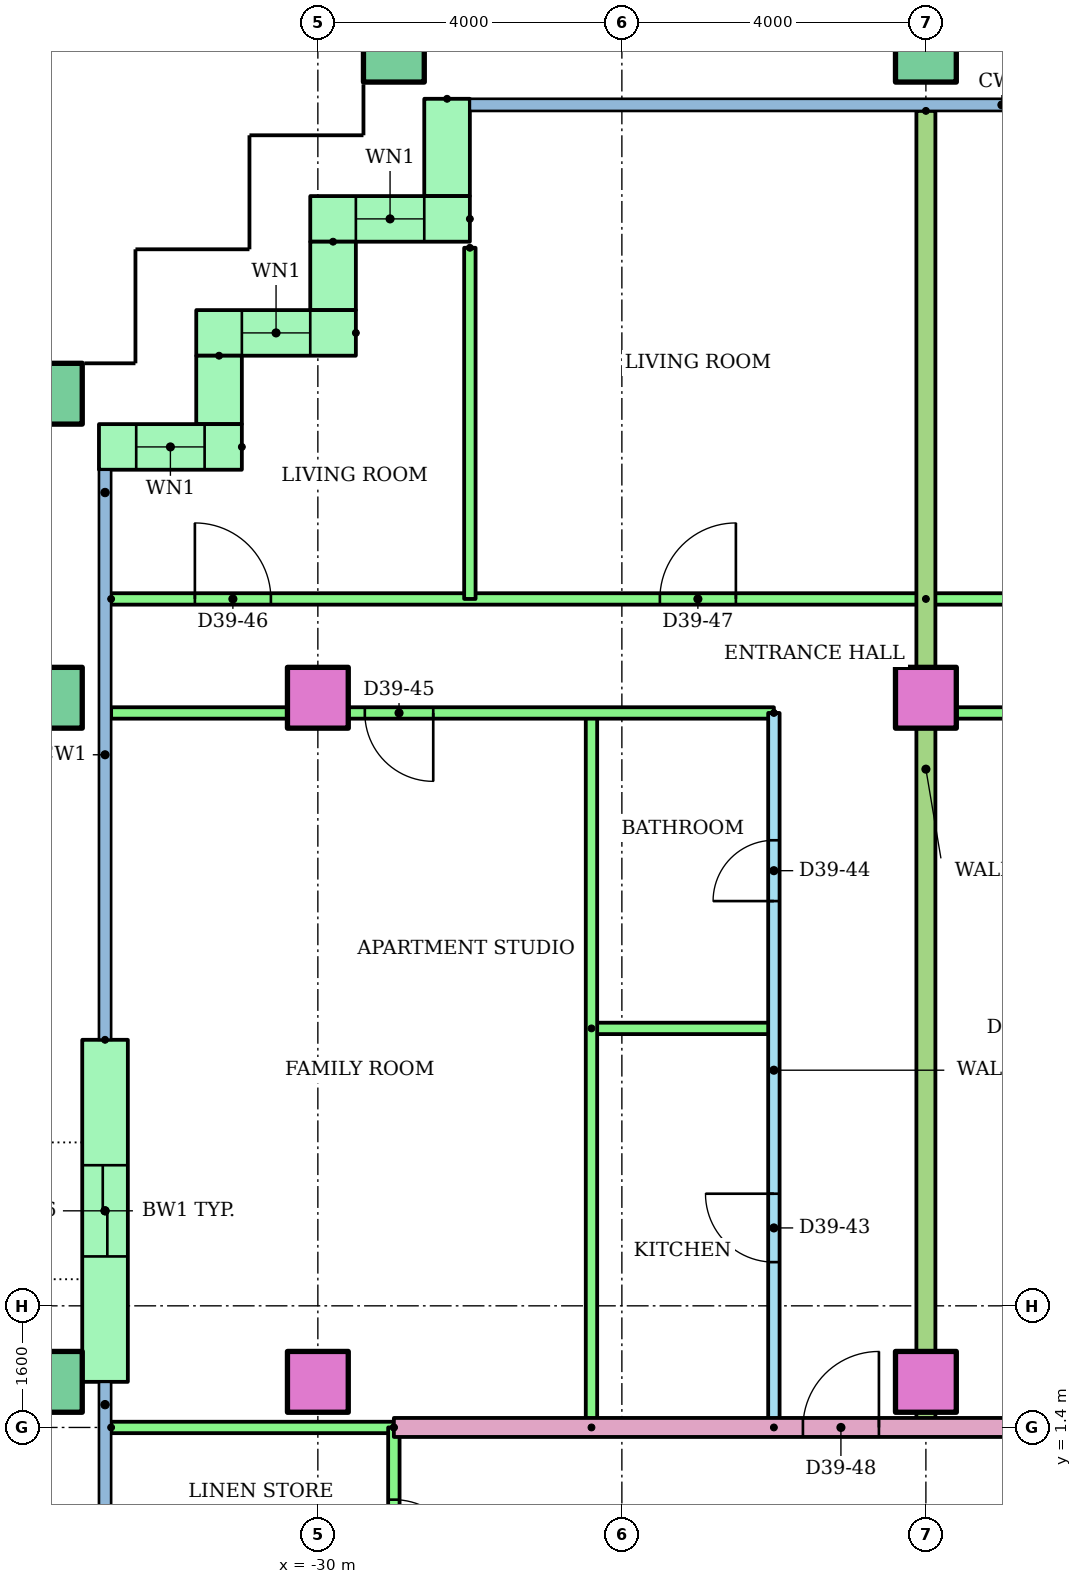
"""IFC4 building model, lengths in metres.
Left out: names, types, materials, properties, quantities, classifications, styles, units other than length and angle.
Written with IfcOpenShell. Run it as: python <this file> out.ifc"""

import sys

from ifc_helpers import new_model, si_unit, direction, frame, frame_2d, origin, origin_2d, place, context, subcontext, project, spatial, rectangle, hollow_rectangle, extrude, element, fill, save


model = new_model("IFC4")
c1 = context("Model", 3, precision=1e-05, world=origin(), true_north=direction((0.0, 1.0)))
c2 = subcontext(c1, "Body", "Model", "MODEL_VIEW")
j1 = project(units=[si_unit("LENGTHUNIT", "METRE"), si_unit("PLANEANGLEUNIT", "RADIAN")], contexts=[c1])
p1 = place(None, origin())
s1 = spatial("IfcSite", under=j1, at=p1, CompositionType="ELEMENT")
p2 = place(p1, origin())
s2 = spatial("IfcBuilding", under=s1, at=p2, CompositionType="ELEMENT")
p3 = place(p2, frame((0.0, 0.0, 148.6)))
s3 = spatial("IfcBuildingStorey", under=s2, at=p3, CompositionType="ELEMENT", Elevation=148.6)
p4 = place(p3, frame((-33.5, 2.0, 0.0)))
e1 = element("IfcColumn", 1, at=p4, inside=s3, PredefinedType="COLUMN", context=c2, shape_type="SweptSolid", body=[
    extrude(hollow_rectangle(XDim=0.8, YDim=0.8, WallThickness=0.04, at=origin_2d()), origin(), (0.0, 0.0, 1.0), 3.2),
])
for number, where in (
    (2, (-30.0, 2.0, 0.0)),
    (3, (-22.0, 2.0, 0.0)),
):
    element("IfcColumn", number, at=place(p3, frame(where)), inside=s3, PredefinedType="COLUMN", context=c2, shape_type="SweptSolid", body=[
        extrude(rectangle(XDim=0.8, YDim=0.8, at=origin_2d()), origin(), (0.0, 0.0, 1.0), 3.2),
    ])
p5 = place(p3, frame((-33.5, 11.0, 0.0)))
e4 = element("IfcColumn", 4, at=p5, inside=s3, PredefinedType="COLUMN", context=c2, shape_type="SweptSolid", body=[
    extrude(hollow_rectangle(XDim=0.8, YDim=0.8, WallThickness=0.04, at=origin_2d()), origin(), (0.0, 0.0, 1.0), 3.2),
])
for number, where in (
    (5, (-30.0, 11.0, 0.0)),
    (6, (-22.0, 11.0, 0.0)),
):
    element("IfcColumn", number, at=place(p3, frame(where)), inside=s3, PredefinedType="COLUMN", context=c2, shape_type="SweptSolid", body=[
        extrude(rectangle(XDim=0.8, YDim=0.8, at=origin_2d()), origin(), (0.0, 0.0, 1.0), 3.2),
    ])
for number, where in (
    (7, (-33.5, 15.0, 0.0)),
    (8, (-29.0, 19.5, 0.0)),
    (9, (-22.0, 19.5, 0.0)),
):
    element("IfcColumn", number, at=place(p3, frame(where)), inside=s3, PredefinedType="COLUMN", context=c2, shape_type="SweptSolid", body=[
        extrude(hollow_rectangle(XDim=0.8, YDim=0.8, WallThickness=0.04, at=origin_2d()), origin(), (0.0, 0.0, 1.0), 3.2),
    ])
p6 = place(p3, frame((-28.3, 18.88, 0.0), z_axis=(0.0, 0.0, 1.0), x_axis=(0.0, -1.0, 0.0)))
e10 = element("IfcWall", 10, at=p6, inside=s3, PredefinedType="STANDARD", context=c2, shape_type="SweptSolid", body=[
    extrude(rectangle(XDim=1.28, YDim=0.6, at=frame_2d((0.64, 0.0))), origin(), (0.0, 0.0, 1.0), 2.8),
])
p7 = place(p3, frame((-28.0, 17.3, 0.0), z_axis=(0.0, 0.0, 1.0), x_axis=(-1.0, 0.0, 0.0)))
e11 = element("IfcWall", 11, at=p7, inside=s3, PredefinedType="STANDARD", context=c2, shape_type="SweptSolid", body=[
    extrude(rectangle(XDim=2.1, YDim=0.6, at=frame_2d((1.05, 0.0))), origin(), (0.0, 0.0, 1.0), 2.8),
])
p8 = place(p7, frame((0.6, 0.0, 0.9)))
e12 = element("IfcOpeningElement", 12, at=p8, cuts=e11, PredefinedType="OPENING", context=c2, shape_type="SweptSolid", body=[
    extrude(rectangle(XDim=0.9, YDim=1.5, at=frame_2d((0.45, 0.75))), frame((0.0, 0.31, 0.0), z_axis=(0.0, -1.0, 0.0), x_axis=(1.0, 0.0, 0.0)), (0.0, 0.0, 1.0), 0.62),
])
p9 = place(p3, frame((-29.8, 17.0, 0.0), z_axis=(0.0, 0.0, 1.0), x_axis=(0.0, -1.0, 0.0)))
e13 = element("IfcWall", 13, at=p9, inside=s3, PredefinedType="STANDARD", context=c2, shape_type="SweptSolid", body=[
    extrude(rectangle(XDim=0.9, YDim=0.6, at=frame_2d((0.45, 0.0))), origin(), (0.0, 0.0, 1.0), 2.8),
])
p10 = place(p3, frame((-29.5, 15.8, 0.0), z_axis=(0.0, 0.0, 1.0), x_axis=(-1.0, 0.0, 0.0)))
e14 = element("IfcWall", 14, at=p10, inside=s3, PredefinedType="STANDARD", context=c2, shape_type="SweptSolid", body=[
    extrude(rectangle(XDim=2.1, YDim=0.6, at=frame_2d((1.05, 0.0))), origin(), (0.0, 0.0, 1.0), 2.8),
])
p11 = place(p10, frame((0.6, 0.0, 0.9)))
e15 = element("IfcOpeningElement", 15, at=p11, cuts=e14, PredefinedType="OPENING", context=c2, shape_type="SweptSolid", body=[
    extrude(rectangle(XDim=0.9, YDim=1.5, at=frame_2d((0.45, 0.75))), frame((0.0, 0.31, 0.0), z_axis=(0.0, -1.0, 0.0), x_axis=(1.0, 0.0, 0.0)), (0.0, 0.0, 1.0), 0.62),
])
p12 = place(p3, frame((-31.3, 15.5, 0.0), z_axis=(0.0, 0.0, 1.0), x_axis=(0.0, -1.0, 0.0)))
e16 = element("IfcWall", 16, at=p12, inside=s3, PredefinedType="STANDARD", context=c2, shape_type="SweptSolid", body=[
    extrude(rectangle(XDim=0.9, YDim=0.6, at=frame_2d((0.45, 0.0))), origin(), (0.0, 0.0, 1.0), 2.8),
])
p13 = place(p3, frame((-31.0, 14.3, 0.0), z_axis=(0.0, 0.0, 1.0), x_axis=(-1.0, 0.0, 0.0)))
e17 = element("IfcWall", 17, at=p13, inside=s3, PredefinedType="STANDARD", context=c2, shape_type="SweptSolid", body=[
    extrude(rectangle(XDim=1.88, YDim=0.6, at=frame_2d((0.94, 0.0))), origin(), (0.0, 0.0, 1.0), 2.8),
])
p14 = place(p13, frame((0.49, 0.0, 0.9)))
e18 = element("IfcOpeningElement", 18, at=p14, cuts=e17, PredefinedType="OPENING", context=c2, shape_type="SweptSolid", body=[
    extrude(rectangle(XDim=0.9, YDim=1.5, at=frame_2d((0.45, 0.75))), frame((0.0, 0.31, 0.0), z_axis=(0.0, -1.0, 0.0), x_axis=(1.0, 0.0, 0.0)), (0.0, 0.0, 1.0), 0.62),
])
p15 = place(p3, frame((-32.8, 6.5, 0.0), z_axis=(0.0, 0.0, 1.0), x_axis=(0.0, -1.0, 0.0)))
e19 = element("IfcWall", 19, at=p15, inside=s3, PredefinedType="STANDARD", context=c2, shape_type="SweptSolid", body=[
    extrude(rectangle(XDim=4.5, YDim=0.6, at=frame_2d((2.25, 0.0))), origin(), (0.0, 0.0, 1.0), 2.8),
])
p16 = place(p15, frame((1.65, 0.0, 0.0)))
e20 = element("IfcOpeningElement", 20, at=p16, cuts=e19, PredefinedType="OPENING", context=c2, shape_type="SweptSolid", body=[
    extrude(rectangle(XDim=1.2, YDim=2.1, at=frame_2d((0.6, 1.05))), frame((0.0, 0.31, 0.0), z_axis=(0.0, -1.0, 0.0), x_axis=(1.0, 0.0, 0.0)), (0.0, 0.0, 1.0), 0.62),
])
p17 = place(p3, frame((-24.0, 1.4, 0.0), z_axis=(0.0, 0.0, 1.0), x_axis=(0.0, 1.0, 0.0)))
e21 = element("IfcWall", 21, at=p17, inside=s3, PredefinedType="PARTITIONING", context=c2, shape_type="SweptSolid", body=[
    extrude(rectangle(XDim=9.4, YDim=0.15, at=frame_2d((4.7, 0.0))), origin(), (0.0, 0.0, 1.0), 2.4),
])
p18 = place(p17, frame((2.175, 0.0, 0.0)))
e22 = element("IfcOpeningElement", 22, at=p18, cuts=e21, PredefinedType="OPENING", context=c2, shape_type="SweptSolid", body=[
    extrude(rectangle(XDim=0.9, YDim=2.1, at=frame_2d((0.45, 1.05))), frame((0.0, 0.085, 0.0), z_axis=(0.0, -1.0, 0.0), x_axis=(1.0, 0.0, 0.0)), (0.0, 0.0, 1.0), 0.17),
])
p19 = place(p17, frame((6.925, 0.0, 0.0)))
e23 = element("IfcOpeningElement", 23, at=p19, cuts=e21, PredefinedType="OPENING", context=c2, shape_type="SweptSolid", body=[
    extrude(rectangle(XDim=0.8, YDim=2.1, at=frame_2d((0.4, 1.05))), frame((0.0, 0.085, 0.0), z_axis=(0.0, -1.0, 0.0), x_axis=(1.0, 0.0, 0.0)), (0.0, 0.0, 1.0), 0.17),
])
p20 = place(p3, frame((-26.4, 6.65, 0.0)))
e24 = element("IfcWall", 24, at=p20, inside=s3, PredefinedType="PARTITIONING", context=c2, shape_type="SweptSolid", body=[
    extrude(rectangle(XDim=2.4, YDim=0.15, at=frame_2d((1.2, 0.0))), origin(), (0.0, 0.0, 1.0), 2.4),
])
p21 = place(p3, frame((-26.4, 1.4, 0.0), z_axis=(0.0, 0.0, 1.0), x_axis=(0.0, 1.0, 0.0)))
e25 = element("IfcWall", 25, at=p21, inside=s3, PredefinedType="PARTITIONING", context=c2, shape_type="SweptSolid", body=[
    extrude(rectangle(XDim=9.4, YDim=0.15, at=frame_2d((4.7, 0.0))), origin(), (0.0, 0.0, 1.0), 2.4),
])
p22 = place(p3, frame((-24.0, 10.8, 0.0), z_axis=(0.0, 0.0, 1.0), x_axis=(-1.0, 0.0, 0.0)))
e26 = element("IfcWall", 26, at=p22, inside=s3, PredefinedType="PARTITIONING", context=c2, shape_type="SweptSolid", body=[
    extrude(rectangle(XDim=8.72, YDim=0.15, at=frame_2d((4.36, 0.0))), origin(), (0.0, 0.0, 1.0), 2.4),
])
p23 = place(p22, frame((4.482, 0.0, 0.0)))
e27 = element("IfcOpeningElement", 27, at=p23, cuts=e26, PredefinedType="OPENING", context=c2, shape_type="SweptSolid", body=[
    extrude(rectangle(XDim=0.9, YDim=2.1, at=frame_2d((0.45, 1.05))), frame((0.0, 0.085, 0.0), z_axis=(0.0, -1.0, 0.0), x_axis=(1.0, 0.0, 0.0)), (0.0, 0.0, 1.0), 0.17),
])
p24 = place(p3, frame((-32.72, 12.3, 0.0)))
e28 = element("IfcWall", 28, at=p24, inside=s3, PredefinedType="PARTITIONING", context=c2, shape_type="SweptSolid", body=[
    extrude(rectangle(XDim=10.72, YDim=0.15, at=frame_2d((5.36, 0.0))), origin(), (0.0, 0.0, 1.0), 2.4),
])
p25 = place(p24, frame((1.102, 0.0, 0.0)))
e29 = element("IfcOpeningElement", 29, at=p25, cuts=e28, PredefinedType="OPENING", context=c2, shape_type="SweptSolid", body=[
    extrude(rectangle(XDim=1.0, YDim=2.1, at=frame_2d((0.5, 1.05))), frame((0.0, 0.085, 0.0), z_axis=(0.0, -1.0, 0.0), x_axis=(1.0, 0.0, 0.0)), (0.0, 0.0, 1.0), 0.17),
])
p26 = place(p24, frame((7.22, 0.0, 0.0)))
e30 = element("IfcOpeningElement", 30, at=p26, cuts=e28, PredefinedType="OPENING", context=c2, shape_type="SweptSolid", body=[
    extrude(rectangle(XDim=1.0, YDim=2.1, at=frame_2d((0.5, 1.05))), frame((0.0, 0.085, 0.0), z_axis=(0.0, -1.0, 0.0), x_axis=(1.0, 0.0, 0.0)), (0.0, 0.0, 1.0), 0.17),
])
p27 = place(p3, frame((-28.0, 16.92, 0.0), z_axis=(0.0, 0.0, 1.0), x_axis=(0.0, -1.0, 0.0)))
e31 = element("IfcWall", 31, at=p27, inside=s3, PredefinedType="PARTITIONING", context=c2, shape_type="SweptSolid", body=[
    extrude(rectangle(XDim=4.62, YDim=0.15, at=frame_2d((2.31, 0.0))), origin(), (0.0, 0.0, 1.0), 2.4),
])
p28 = place(p3, frame((-16.0, 10.8, 0.0), z_axis=(0.0, 0.0, 1.0), x_axis=(-1.0, 0.0, 0.0)))
e32 = element("IfcWall", 32, at=p28, inside=s3, PredefinedType="PARTITIONING", context=c2, shape_type="SweptSolid", body=[
    extrude(rectangle(XDim=6.0, YDim=0.15, at=frame_2d((3.0, 0.0))), origin(), (0.0, 0.0, 1.0), 2.4),
])
p29 = place(p28, frame((3.75, 0.0, 0.0)))
e33 = element("IfcOpeningElement", 33, at=p29, cuts=e32, PredefinedType="OPENING", context=c2, shape_type="SweptSolid", body=[
    extrude(rectangle(XDim=0.9, YDim=2.1, at=frame_2d((0.45, 1.05))), frame((0.0, 0.085, 0.0), z_axis=(0.0, -1.0, 0.0), x_axis=(1.0, 0.0, 0.0)), (0.0, 0.0, 1.0), 0.17),
])
p30 = place(p3, frame((-22.0, 12.3, 0.0)))
e34 = element("IfcWall", 34, at=p30, inside=s3, PredefinedType="PARTITIONING", context=c2, shape_type="SweptSolid", body=[
    extrude(rectangle(XDim=8.0, YDim=0.15, at=frame_2d((4.0, 0.0))), origin(), (0.0, 0.0, 1.0), 2.4),
])
p31 = place(p30, frame((3.5, 0.0, 0.0)))
e35 = element("IfcOpeningElement", 35, at=p31, cuts=e34, PredefinedType="OPENING", context=c2, shape_type="SweptSolid", body=[
    extrude(rectangle(XDim=1.0, YDim=2.1, at=frame_2d((0.5, 1.05))), frame((0.0, 0.085, 0.0), z_axis=(0.0, -1.0, 0.0), x_axis=(1.0, 0.0, 0.0)), (0.0, 0.0, 1.0), 0.17),
])
p32 = place(p3, frame((-22.0, 18.721, 0.0), z_axis=(0.0, 0.0, 1.0), x_axis=(0.0, -1.0, 0.0)))
e36 = element("IfcWall", 36, at=p32, inside=s3, PredefinedType="PARTITIONING", context=c2, shape_type="SweptSolid", body=[
    extrude(rectangle(XDim=17.321, YDim=0.25, at=frame_2d((8.661, 0.0))), origin(), (0.0, 0.0, 1.0), 2.4),
])
p33 = place(p3, frame((-29.0, 1.4, 0.0)))
e37 = element("IfcWall", 37, at=p33, inside=s3, PredefinedType="PARTITIONING", context=c2, shape_type="SweptSolid", body=[
    extrude(rectangle(XDim=15.0, YDim=0.25, at=frame_2d((7.5, 0.0))), origin(), (0.0, 0.0, 1.0), 2.4),
])
p34 = place(p33, frame((5.382, 0.0, 0.0)))
e38 = element("IfcOpeningElement", 38, at=p34, cuts=e37, PredefinedType="OPENING", context=c2, shape_type="SweptSolid", body=[
    extrude(rectangle(XDim=1.0, YDim=2.1, at=frame_2d((0.5, 1.05))), frame((0.0, 0.135, 0.0), z_axis=(0.0, -1.0, 0.0), x_axis=(1.0, 0.0, 0.0)), (0.0, 0.0, 1.0), 0.27),
])
p35 = place(p33, frame((13.5, 0.0, 0.0)))
e39 = element("IfcOpeningElement", 39, at=p35, cuts=e37, PredefinedType="OPENING", context=c2, shape_type="SweptSolid", body=[
    extrude(rectangle(XDim=1.0, YDim=2.1, at=frame_2d((0.5, 1.05))), frame((0.0, 0.135, 0.0), z_axis=(0.0, -1.0, 0.0), x_axis=(1.0, 0.0, 0.0)), (0.0, 0.0, 1.0), 0.27),
])
p36 = place(p3, frame((-32.72, 1.4, 0.0)))
e40 = element("IfcWall", 40, at=p36, inside=s3, PredefinedType="PARTITIONING", context=c2, shape_type="SweptSolid", body=[
    extrude(rectangle(XDim=3.72, YDim=0.15, at=frame_2d((1.86, 0.0))), origin(), (0.0, 0.0, 1.0), 2.4),
])
p37 = place(p3, frame((-29.0, 1.4, 0.0), z_axis=(0.0, 0.0, 1.0), x_axis=(0.0, -1.0, 0.0)))
e41 = element("IfcWall", 41, at=p37, inside=s3, PredefinedType="PARTITIONING", context=c2, shape_type="SweptSolid", body=[
    extrude(rectangle(XDim=2.8, YDim=0.15, at=frame_2d((1.4, 0.0))), origin(), (0.0, 0.0, 1.0), 2.4),
])
p38 = place(p37, frame((0.95, 0.0, 0.0)))
e42 = element("IfcOpeningElement", 42, at=p38, cuts=e41, PredefinedType="OPENING", context=c2, shape_type="SweptSolid", body=[
    extrude(rectangle(XDim=0.9, YDim=2.1, at=frame_2d((0.45, 1.05))), frame((0.0, 0.085, 0.0), z_axis=(0.0, -1.0, 0.0), x_axis=(1.0, 0.0, 0.0)), (0.0, 0.0, 1.0), 0.17),
])
p39 = place(p8, origin())
e43 = element("IfcWindow", 43, at=p39, inside=s3, PartitioningType="SINGLE_PANEL", PredefinedType="WINDOW", context=c2, shape_type="SweptSolid", body=[
    extrude(rectangle(XDim=0.9, YDim=1.5, at=frame_2d((0.45, 0.75))), frame((0.0, 0.03, 0.0), z_axis=(0.0, -1.0, 0.0), x_axis=(1.0, 0.0, 0.0)), (0.0, 0.0, 1.0), 0.06),
])
fill(e12, e43)
p40 = place(p11, origin())
e44 = element("IfcWindow", 44, at=p40, inside=s3, PartitioningType="SINGLE_PANEL", PredefinedType="WINDOW", context=c2, shape_type="SweptSolid", body=[
    extrude(rectangle(XDim=0.9, YDim=1.5, at=frame_2d((0.45, 0.75))), frame((0.0, 0.03, 0.0), z_axis=(0.0, -1.0, 0.0), x_axis=(1.0, 0.0, 0.0)), (0.0, 0.0, 1.0), 0.06),
])
fill(e15, e44)
p41 = place(p14, origin())
e45 = element("IfcWindow", 45, at=p41, inside=s3, PartitioningType="SINGLE_PANEL", PredefinedType="WINDOW", context=c2, shape_type="SweptSolid", body=[
    extrude(rectangle(XDim=0.9, YDim=1.5, at=frame_2d((0.45, 0.75))), frame((0.0, 0.03, 0.0), z_axis=(0.0, -1.0, 0.0), x_axis=(1.0, 0.0, 0.0)), (0.0, 0.0, 1.0), 0.06),
])
fill(e18, e45)
p42 = place(p18, origin())
e46 = element("IfcDoor", 46, at=p42, inside=s3, OperationType="SINGLE_SWING_RIGHT", PredefinedType="DOOR", context=c2, shape_type="SweptSolid", body=[
    extrude(rectangle(XDim=0.9, YDim=2.1, at=frame_2d((0.45, 1.05))), frame((0.0, 0.025, 0.0), z_axis=(0.0, -1.0, 0.0), x_axis=(1.0, 0.0, 0.0)), (0.0, 0.0, 1.0), 0.05),
])
fill(e22, e46)
p43 = place(p19, origin())
e47 = element("IfcDoor", 47, at=p43, inside=s3, OperationType="SINGLE_SWING_LEFT", PredefinedType="DOOR", context=c2, shape_type="SweptSolid", body=[
    extrude(rectangle(XDim=0.8, YDim=2.1, at=frame_2d((0.4, 1.05))), frame((0.0, 0.025, 0.0), z_axis=(0.0, -1.0, 0.0), x_axis=(1.0, 0.0, 0.0)), (0.0, 0.0, 1.0), 0.05),
])
fill(e23, e47)
p44 = place(p23, origin())
e48 = element("IfcDoor", 48, at=p44, inside=s3, OperationType="SINGLE_SWING_LEFT", PredefinedType="DOOR", context=c2, shape_type="SweptSolid", body=[
    extrude(rectangle(XDim=0.9, YDim=2.1, at=frame_2d((0.45, 1.05))), frame((0.0, 0.025, 0.0), z_axis=(0.0, -1.0, 0.0), x_axis=(1.0, 0.0, 0.0)), (0.0, 0.0, 1.0), 0.05),
])
fill(e27, e48)
p45 = place(p25, origin())
e49 = element("IfcDoor", 49, at=p45, inside=s3, OperationType="SINGLE_SWING_LEFT", PredefinedType="DOOR", context=c2, shape_type="SweptSolid", body=[
    extrude(rectangle(XDim=1.0, YDim=2.1, at=frame_2d((0.5, 1.05))), frame((0.0, 0.025, 0.0), z_axis=(0.0, -1.0, 0.0), x_axis=(1.0, 0.0, 0.0)), (0.0, 0.0, 1.0), 0.05),
])
fill(e29, e49)
p46 = place(p26, origin())
e50 = element("IfcDoor", 50, at=p46, inside=s3, OperationType="SINGLE_SWING_RIGHT", PredefinedType="DOOR", context=c2, shape_type="SweptSolid", body=[
    extrude(rectangle(XDim=1.0, YDim=2.1, at=frame_2d((0.5, 1.05))), frame((0.0, 0.025, 0.0), z_axis=(0.0, -1.0, 0.0), x_axis=(1.0, 0.0, 0.0)), (0.0, 0.0, 1.0), 0.05),
])
fill(e30, e50)
p47 = place(p34, origin())
e51 = element("IfcDoor", 51, at=p47, inside=s3, OperationType="SINGLE_SWING_RIGHT", PredefinedType="DOOR", context=c2, shape_type="SweptSolid", body=[
    extrude(rectangle(XDim=1.0, YDim=2.1, at=frame_2d((0.5, 1.05))), frame((0.0, 0.025, 0.0), z_axis=(0.0, -1.0, 0.0), x_axis=(1.0, 0.0, 0.0)), (0.0, 0.0, 1.0), 0.05),
])
fill(e38, e51)
p48 = place(p38, origin())
e52 = element("IfcDoor", 52, at=p48, inside=s3, OperationType="SINGLE_SWING_RIGHT", PredefinedType="DOOR", context=c2, shape_type="SweptSolid", body=[
    extrude(rectangle(XDim=0.9, YDim=2.1, at=frame_2d((0.45, 1.05))), frame((0.0, 0.025, 0.0), z_axis=(0.0, -1.0, 0.0), x_axis=(1.0, 0.0, 0.0)), (0.0, 0.0, 1.0), 0.05),
])
fill(e42, e52)
p49 = place(p16, origin())
e53 = element("IfcDoor", 53, at=p49, inside=s3, OperationType="SLIDING_TO_LEFT", PredefinedType="DOOR", context=c2, shape_type="SweptSolid", body=[
    extrude(rectangle(XDim=1.2, YDim=2.1, at=frame_2d((0.6, 1.05))), frame((0.0, 0.025, 0.0), z_axis=(0.0, -1.0, 0.0), x_axis=(1.0, 0.0, 0.0)), (0.0, 0.0, 1.0), 0.05),
])
fill(e20, e53)
save(model, sys.argv[1])
